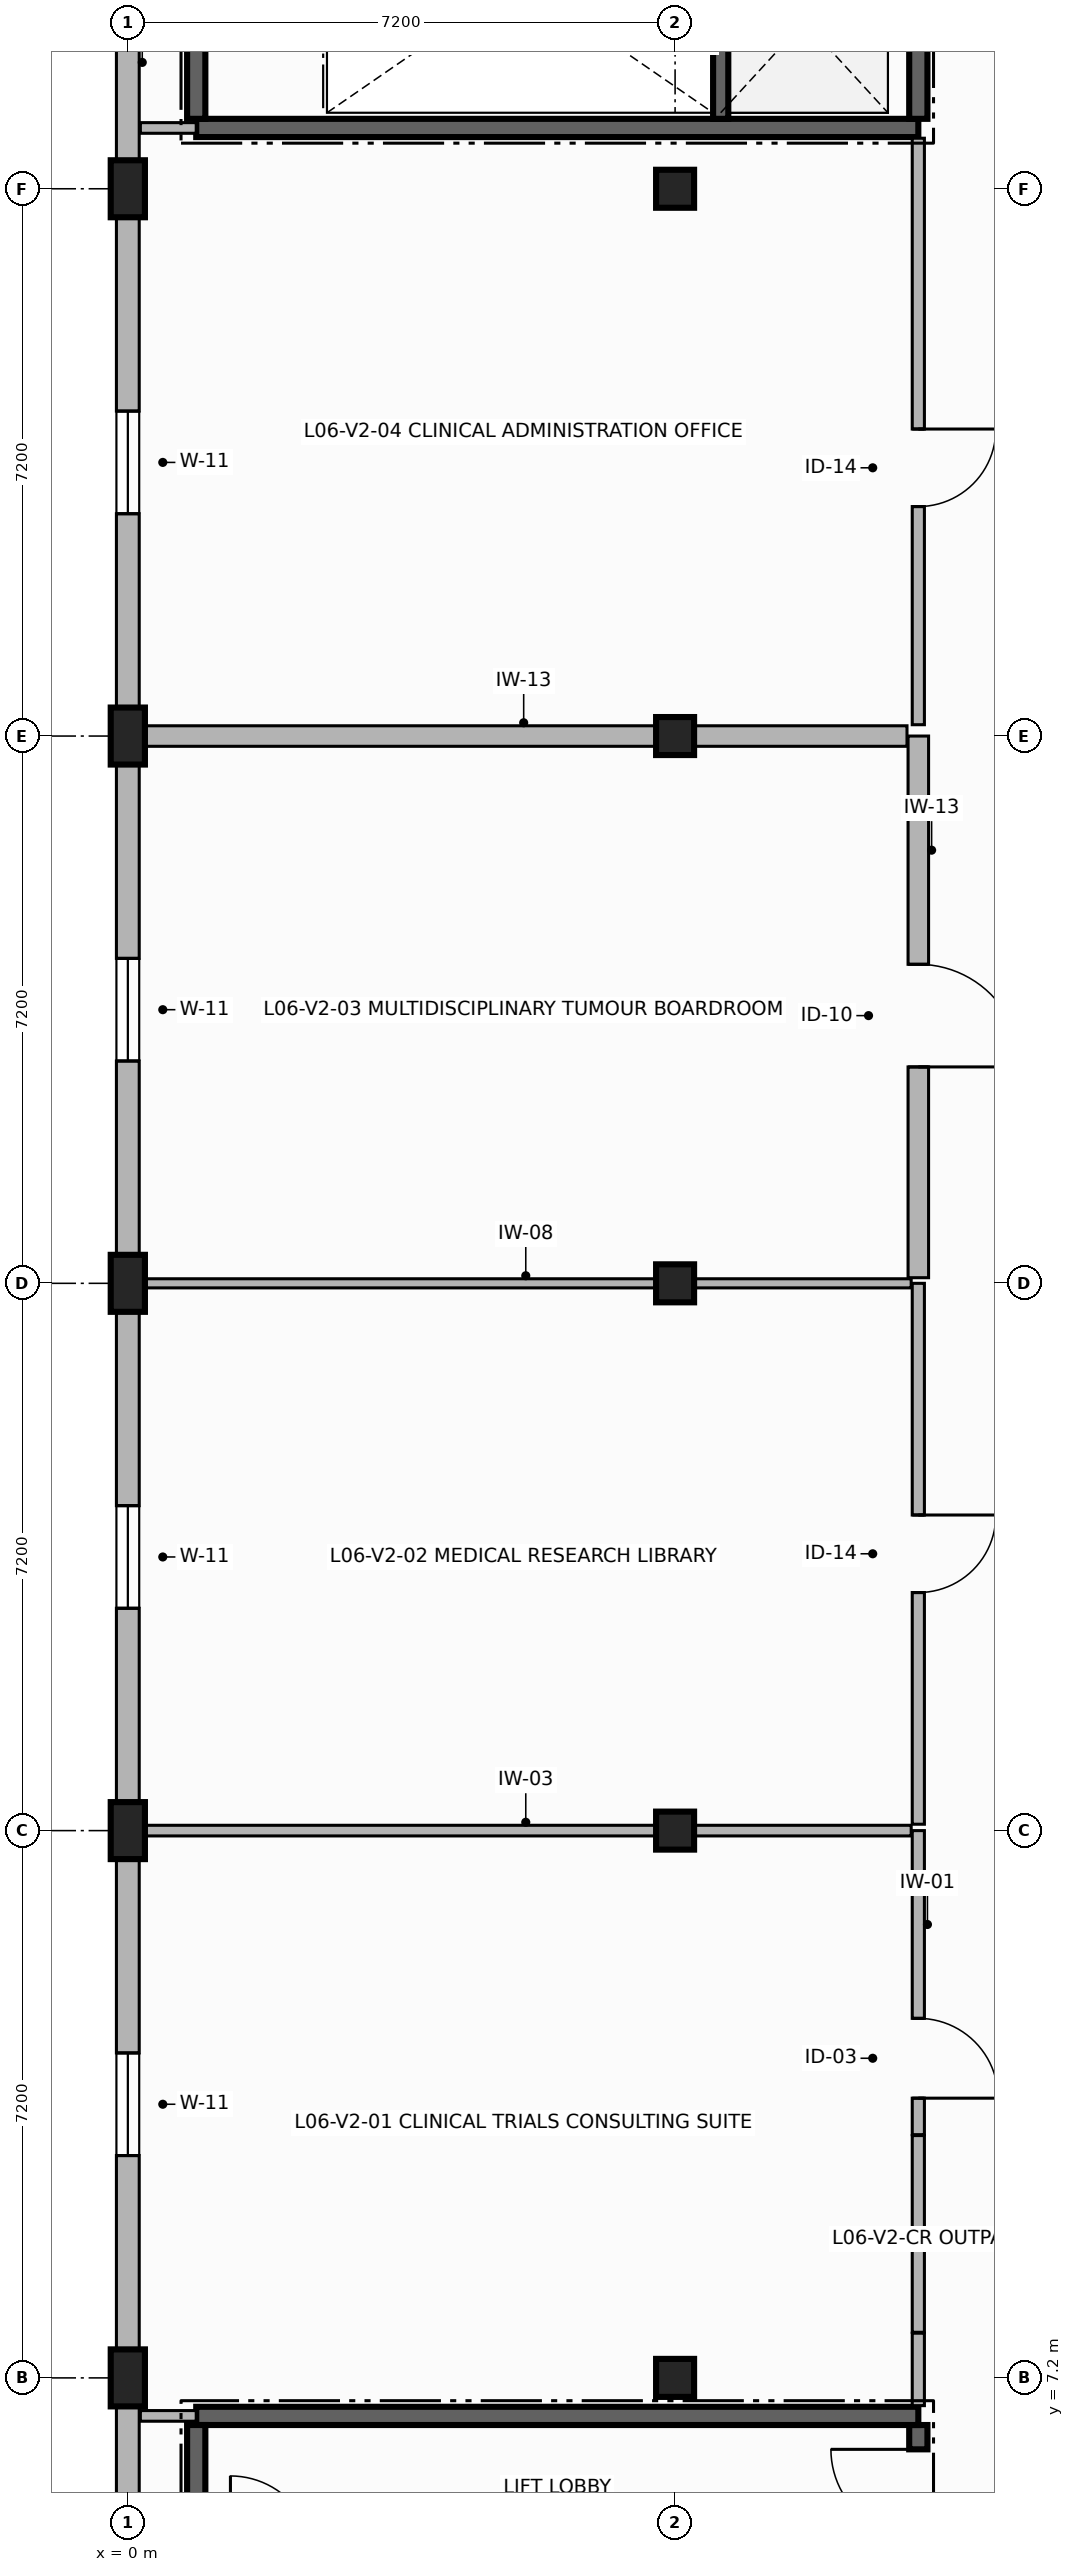
"""IFC4 building model, lengths in metres.
Left out: names, types, materials, properties, quantities, classifications, styles, units other than length and angle.
Written with IfcOpenShell. Run it as: python <this file> out.ifc"""

import sys

from ifc_helpers import new_model, si_unit, direction, frame, frame_2d, origin, origin_2d, place, context, subcontext, project, spatial, rectangle, extrude, element, fill, save


model = new_model("IFC4")
c1 = context("Model", 3, precision=1e-05, world=origin(), true_north=direction((0.0, 1.0)))
c2 = subcontext(c1, "Body", "Model", "MODEL_VIEW")
j1 = project(units=[si_unit("LENGTHUNIT", "METRE"), si_unit("PLANEANGLEUNIT", "RADIAN")], contexts=[c1])
p1 = place(None, origin())
s1 = spatial("IfcSite", under=j1, at=p1, CompositionType="ELEMENT")
p2 = place(p1, origin())
s2 = spatial("IfcBuilding", under=s1, at=p2, CompositionType="ELEMENT")
p3 = place(p2, frame((0.0, 0.0, 23.4)))
s3 = spatial("IfcBuildingStorey", under=s2, at=p3, CompositionType="ELEMENT", Elevation=23.4)
for number, where, z_axis, x_axis in (
    (1, (0.0, 7.2, 0.0), (0.0, 0.0, 1.0), (1.0, 0.0, 0.0)),
    (2, (0.0, 14.4, 0.0), (0.0, 0.0, 1.0), (1.0, 0.0, 0.0)),
    (3, (0.0, 21.6, 0.0), (0.0, 0.0, 1.0), (1.0, 0.0, 0.0)),
    (4, (0.0, 28.8, 0.0), (0.0, 0.0, 1.0), (1.0, 0.0, 0.0)),
    (5, (0.0, 36.0, 0.0), (0.0, 0.0, 1.0), (1.0, 0.0, 0.0)),
):
    element("IfcColumn", number, at=place(p3, frame(where, z_axis=z_axis, x_axis=x_axis)), inside=s3, PredefinedType="PILASTER", context=c2, shape_type="SweptSolid", body=[
        extrude(rectangle(XDim=0.45, YDim=0.75, at=origin_2d()), origin(), (0.0, 0.0, 1.0), 3.36),
    ])
for number, where, z_axis, x_axis in (
    (6, (7.2, 7.2, 0.0), (0.0, 0.0, 1.0), (1.0, 0.0, 0.0)),
    (7, (7.2, 14.4, 0.0), (0.0, 0.0, 1.0), (1.0, 0.0, 0.0)),
    (8, (7.2, 21.6, 0.0), (0.0, 0.0, 1.0), (1.0, 0.0, 0.0)),
    (9, (7.2, 28.8, 0.0), (0.0, 0.0, 1.0), (1.0, 0.0, 0.0)),
    (10, (7.2, 36.0, 0.0), (0.0, 0.0, 1.0), (1.0, 0.0, 0.0)),
):
    element("IfcColumn", number, at=place(p3, frame(where, z_axis=z_axis, x_axis=x_axis)), inside=s3, PredefinedType="COLUMN", context=c2, shape_type="SweptSolid", body=[
        extrude(rectangle(XDim=0.5, YDim=0.5, at=origin_2d()), origin(), (0.0, 0.0, 1.0), 3.36),
    ])
p4 = place(p3, frame((0.0, 43.2, 0.0), z_axis=(0.0, 0.0, 1.0), x_axis=(0.0, -1.0, 0.0)))
e11 = element("IfcWall", 11, at=p4, inside=s3, PredefinedType="SOLIDWALL", context=c2, shape_type="SweptSolid", body=[
    extrude(rectangle(XDim=7.2, YDim=0.3, at=frame_2d((3.6, 0.0))), origin(), (0.0, 0.0, 1.0), 2.69),
])
p5 = place(p4, frame((2.525, 0.0, 0.85)))
e12 = element("IfcOpeningElement", 12, at=p5, cuts=e11, PredefinedType="OPENING", context=c2, shape_type="SweptSolid", body=[
    extrude(rectangle(XDim=1.35, YDim=1.6, at=frame_2d((0.675, 0.8))), frame((0.0, 0.16, 0.0), z_axis=(0.0, -1.0, 0.0), x_axis=(1.0, 0.0, 0.0)), (0.0, 0.0, 1.0), 0.32),
])
p6 = place(p3, frame((0.0, 36.0, 0.0), z_axis=(0.0, 0.0, 1.0), x_axis=(0.0, -1.0, 0.0)))
e13 = element("IfcWall", 13, at=p6, inside=s3, PredefinedType="SOLIDWALL", context=c2, shape_type="SweptSolid", body=[
    extrude(rectangle(XDim=7.2, YDim=0.3, at=frame_2d((3.6, 0.0))), origin(), (0.0, 0.0, 1.0), 2.69),
])
p7 = place(p6, frame((2.925, 0.0, 0.85)))
e14 = element("IfcOpeningElement", 14, at=p7, cuts=e13, PredefinedType="OPENING", context=c2, shape_type="SweptSolid", body=[
    extrude(rectangle(XDim=1.35, YDim=1.6, at=frame_2d((0.675, 0.8))), frame((0.0, 0.16, 0.0), z_axis=(0.0, -1.0, 0.0), x_axis=(1.0, 0.0, 0.0)), (0.0, 0.0, 1.0), 0.32),
])
p8 = place(p3, frame((0.0, 28.8, 0.0), z_axis=(0.0, 0.0, 1.0), x_axis=(0.0, -1.0, 0.0)))
e15 = element("IfcWall", 15, at=p8, inside=s3, PredefinedType="SOLIDWALL", context=c2, shape_type="SweptSolid", body=[
    extrude(rectangle(XDim=7.2, YDim=0.3, at=frame_2d((3.6, 0.0))), origin(), (0.0, 0.0, 1.0), 2.69),
])
p9 = place(p8, frame((2.925, 0.0, 0.85)))
e16 = element("IfcOpeningElement", 16, at=p9, cuts=e15, PredefinedType="OPENING", context=c2, shape_type="SweptSolid", body=[
    extrude(rectangle(XDim=1.35, YDim=1.6, at=frame_2d((0.675, 0.8))), frame((0.0, 0.16, 0.0), z_axis=(0.0, -1.0, 0.0), x_axis=(1.0, 0.0, 0.0)), (0.0, 0.0, 1.0), 0.32),
])
p10 = place(p3, frame((0.0, 21.6, 0.0), z_axis=(0.0, 0.0, 1.0), x_axis=(0.0, -1.0, 0.0)))
e17 = element("IfcWall", 17, at=p10, inside=s3, PredefinedType="SOLIDWALL", context=c2, shape_type="SweptSolid", body=[
    extrude(rectangle(XDim=7.2, YDim=0.3, at=frame_2d((3.6, 0.0))), origin(), (0.0, 0.0, 1.0), 2.69),
])
p11 = place(p10, frame((2.925, 0.0, 0.85)))
e18 = element("IfcOpeningElement", 18, at=p11, cuts=e17, PredefinedType="OPENING", context=c2, shape_type="SweptSolid", body=[
    extrude(rectangle(XDim=1.35, YDim=1.6, at=frame_2d((0.675, 0.8))), frame((0.0, 0.16, 0.0), z_axis=(0.0, -1.0, 0.0), x_axis=(1.0, 0.0, 0.0)), (0.0, 0.0, 1.0), 0.32),
])
p12 = place(p3, frame((0.0, 14.4, 0.0), z_axis=(0.0, 0.0, 1.0), x_axis=(0.0, -1.0, 0.0)))
e19 = element("IfcWall", 19, at=p12, inside=s3, PredefinedType="SOLIDWALL", context=c2, shape_type="SweptSolid", body=[
    extrude(rectangle(XDim=7.2, YDim=0.3, at=frame_2d((3.6, 0.0))), origin(), (0.0, 0.0, 1.0), 2.69),
])
p13 = place(p12, frame((2.925, 0.0, 0.85)))
e20 = element("IfcOpeningElement", 20, at=p13, cuts=e19, PredefinedType="OPENING", context=c2, shape_type="SweptSolid", body=[
    extrude(rectangle(XDim=1.35, YDim=1.6, at=frame_2d((0.675, 0.8))), frame((0.0, 0.16, 0.0), z_axis=(0.0, -1.0, 0.0), x_axis=(1.0, 0.0, 0.0)), (0.0, 0.0, 1.0), 0.32),
])
p14 = place(p3, frame((0.0, 7.2, 0.0), z_axis=(0.0, 0.0, 1.0), x_axis=(0.0, -1.0, 0.0)))
e21 = element("IfcWall", 21, at=p14, inside=s3, PredefinedType="SOLIDWALL", context=c2, shape_type="SweptSolid", body=[
    extrude(rectangle(XDim=7.2, YDim=0.3, at=frame_2d((3.6, 0.0))), origin(), (0.0, 0.0, 1.0), 2.69),
])
p15 = place(p14, frame((3.175, 0.0, 0.85)))
e22 = element("IfcOpeningElement", 22, at=p15, cuts=e21, PredefinedType="OPENING", context=c2, shape_type="SweptSolid", body=[
    extrude(rectangle(XDim=1.35, YDim=1.6, at=frame_2d((0.675, 0.8))), frame((0.0, 0.16, 0.0), z_axis=(0.0, -1.0, 0.0), x_axis=(1.0, 0.0, 0.0)), (0.0, 0.0, 1.0), 0.32),
])
p16 = place(p3, frame((10.4, 1.02, 0.0), z_axis=(0.0, 0.0, 1.0), x_axis=(0.0, 1.0, 0.0)))
e23 = element("IfcWall", 23, at=p16, inside=s3, PredefinedType="SHEAR", context=c2, shape_type="SweptSolid", body=[
    extrude(rectangle(XDim=5.56, YDim=0.24, at=frame_2d((2.78, 0.0))), origin(), (0.0, 0.0, 1.0), 3.36),
])
p17 = place(p16, frame((4.09, 0.0, 0.0)))
e24 = element("IfcOpeningElement", 24, at=p17, cuts=e23, PredefinedType="OPENING", context=c2, shape_type="SweptSolid", body=[
    extrude(rectangle(XDim=1.15, YDim=2.2, at=frame_2d((0.575, 1.1))), frame((0.0, 0.13, 0.0), z_axis=(0.0, -1.0, 0.0), x_axis=(1.0, 0.0, 0.0)), (0.0, 0.0, 1.0), 0.26),
])
p18 = place(p3, frame((10.4, 6.7, 0.0), z_axis=(0.0, 0.0, 1.0), x_axis=(-1.0, 0.0, 0.0)))
e25 = element("IfcWall", 25, at=p18, inside=s3, PredefinedType="SHEAR", context=c2, shape_type="SweptSolid", body=[
    extrude(rectangle(XDim=9.5, YDim=0.24, at=frame_2d((4.75, 0.0))), origin(), (0.0, 0.0, 1.0), 3.36),
])
p19 = place(p3, frame((0.9, 6.58, 0.0), z_axis=(0.0, 0.0, 1.0), x_axis=(0.0, -1.0, 0.0)))
e26 = element("IfcWall", 26, at=p19, inside=s3, PredefinedType="SHEAR", context=c2, shape_type="SweptSolid", body=[
    extrude(rectangle(XDim=5.56, YDim=0.24, at=frame_2d((2.78, 0.0))), origin(), (0.0, 0.0, 1.0), 3.36),
])
p20 = place(p3, frame((0.9, 36.8, 0.0), z_axis=(0.0, 0.0, 1.0), x_axis=(1.0, 0.0, 0.0)))
e27 = element("IfcWall", 27, at=p20, inside=s3, PredefinedType="SHEAR", context=c2, shape_type="SweptSolid", body=[
    extrude(rectangle(XDim=9.5, YDim=0.24, at=frame_2d((4.75, 0.0))), origin(), (0.0, 0.0, 1.0), 3.36),
])
p21 = place(p3, frame((10.4, 36.92, 0.0), z_axis=(0.0, 0.0, 1.0), x_axis=(0.0, 1.0, 0.0)))
e28 = element("IfcWall", 28, at=p21, inside=s3, PredefinedType="SHEAR", context=c2, shape_type="SweptSolid", body=[
    extrude(rectangle(XDim=5.56, YDim=0.24, at=frame_2d((2.78, 0.0))), origin(), (0.0, 0.0, 1.0), 3.36),
])
p22 = place(p21, frame((4.09, 0.0, 0.0)))
e29 = element("IfcOpeningElement", 29, at=p22, cuts=e28, PredefinedType="OPENING", context=c2, shape_type="SweptSolid", body=[
    extrude(rectangle(XDim=1.15, YDim=2.2, at=frame_2d((0.575, 1.1))), frame((0.0, 0.13, 0.0), z_axis=(0.0, -1.0, 0.0), x_axis=(1.0, 0.0, 0.0)), (0.0, 0.0, 1.0), 0.26),
])
p23 = place(p3, frame((0.9, 42.48, 0.0), z_axis=(0.0, 0.0, 1.0), x_axis=(0.0, -1.0, 0.0)))
e30 = element("IfcWall", 30, at=p23, inside=s3, PredefinedType="SHEAR", context=c2, shape_type="SweptSolid", body=[
    extrude(rectangle(XDim=5.56, YDim=0.24, at=frame_2d((2.78, 0.0))), origin(), (0.0, 0.0, 1.0), 3.36),
])
p24 = place(p3, frame((7.8, 36.92, 0.0), z_axis=(0.0, 0.0, 1.0), x_axis=(0.0, 1.0, 0.0)))
e31 = element("IfcWall", 31, at=p24, inside=s3, PredefinedType="SHEAR", context=c2, shape_type="SweptSolid", body=[
    extrude(rectangle(XDim=3.68, YDim=0.2, at=frame_2d((1.84, 0.0))), origin(), (0.0, 0.0, 1.0), 3.36),
])
p25 = place(p3, frame((10.4, 14.4, 0.0), z_axis=(0.0, 0.0, 1.0), x_axis=(0.0, -1.0, 0.0)))
e32 = element("IfcWall", 32, at=p25, inside=s3, PredefinedType="PARTITIONING", context=c2, shape_type="SweptSolid", body=[
    extrude(rectangle(XDim=4.0, YDim=0.16, at=frame_2d((2.0, 0.0))), origin(), (0.0, 0.0, 1.0), 2.68),
])
p26 = place(p25, frame((2.47, 0.0, 0.0)))
e33 = element("IfcOpeningElement", 33, at=p26, cuts=e32, PredefinedType="OPENING", context=c2, shape_type="SweptSolid", body=[
    extrude(rectangle(XDim=1.05, YDim=2.15, at=frame_2d((0.525, 1.075))), frame((0.0, 0.09, 0.0), z_axis=(0.0, -1.0, 0.0), x_axis=(1.0, 0.0, 0.0)), (0.0, 0.0, 1.0), 0.18),
])
p27 = place(p3, frame((10.4, 10.388, 0.0), z_axis=(0.0, 0.0, 1.0), x_axis=(0.0, -1.0, 0.0)))
e34 = element("IfcWall", 34, at=p27, inside=s3, PredefinedType="PARTITIONING", context=c2, shape_type="SweptSolid", body=[
    extrude(rectangle(XDim=2.588, YDim=0.16, at=frame_2d((1.294, 0.0))), origin(), (0.0, 0.0, 1.0), 2.68),
])
p28 = place(p3, frame((10.4, 7.788, 0.0), z_axis=(0.0, 0.0, 1.0), x_axis=(0.0, -1.0, 0.0)))
e35 = element("IfcWall", 35, at=p28, inside=s3, PredefinedType="PARTITIONING", context=c2, shape_type="SweptSolid", body=[
    extrude(rectangle(XDim=0.953, YDim=0.16, at=frame_2d((0.477, 0.0))), origin(), (0.0, 0.0, 1.0), 2.68),
])
p29 = place(p3, frame((0.9, 6.7, 0.0), z_axis=(0.0, 0.0, 1.0), x_axis=(-1.0, 0.0, 0.0)))
e36 = element("IfcWall", 36, at=p29, inside=s3, PredefinedType="PARTITIONING", context=c2, shape_type="SweptSolid", body=[
    extrude(rectangle(XDim=0.735, YDim=0.14, at=frame_2d((0.367, 0.0))), origin(), (0.0, 0.0, 1.0), 2.68),
])
p30 = place(p3, frame((0.165, 14.4, 0.0), z_axis=(0.0, 0.0, 1.0), x_axis=(1.0, 0.0, 0.0)))
e37 = element("IfcWall", 37, at=p30, inside=s3, PredefinedType="PARTITIONING", context=c2, shape_type="SweptSolid", body=[
    extrude(rectangle(XDim=10.141, YDim=0.14, at=frame_2d((5.07, 0.0))), origin(), (0.0, 0.0, 1.0), 2.68),
])
p31 = place(p3, frame((10.4, 21.6, 0.0), z_axis=(0.0, 0.0, 1.0), x_axis=(0.0, -1.0, 0.0)))
e38 = element("IfcWall", 38, at=p31, inside=s3, PredefinedType="PARTITIONING", context=c2, shape_type="SweptSolid", body=[
    extrude(rectangle(XDim=7.116, YDim=0.16, at=frame_2d((3.558, 0.0))), origin(), (0.0, 0.0, 1.0), 2.68),
])
p32 = place(p31, frame((3.048, 0.0, 0.0)))
e39 = element("IfcOpeningElement", 39, at=p32, cuts=e38, PredefinedType="OPENING", context=c2, shape_type="SweptSolid", body=[
    extrude(rectangle(XDim=1.02, YDim=2.15, at=frame_2d((0.51, 1.075))), frame((0.0, 0.09, 0.0), z_axis=(0.0, -1.0, 0.0), x_axis=(1.0, 0.0, 0.0)), (0.0, 0.0, 1.0), 0.18),
])
p33 = place(p3, frame((0.165, 21.6, 0.0), z_axis=(0.0, 0.0, 1.0), x_axis=(1.0, 0.0, 0.0)))
e40 = element("IfcWall", 40, at=p33, inside=s3, PredefinedType="PARTITIONING", context=c2, shape_type="SweptSolid", body=[
    extrude(rectangle(XDim=10.141, YDim=0.12, at=frame_2d((5.07, 0.0))), origin(), (0.0, 0.0, 1.0), 2.68),
])
p34 = place(p3, frame((10.4, 28.8, 0.0), z_axis=(0.0, 0.0, 1.0), x_axis=(0.0, -1.0, 0.0)))
e41 = element("IfcWall", 41, at=p34, inside=s3, PredefinedType="PARTITIONING", context=c2, shape_type="SweptSolid", body=[
    extrude(rectangle(XDim=7.126, YDim=0.27, at=frame_2d((3.563, 0.0))), origin(), (0.0, 0.0, 1.0), 2.68),
])
p35 = place(p34, frame((3.003, 0.0, 0.0)))
e42 = element("IfcOpeningElement", 42, at=p35, cuts=e41, PredefinedType="OPENING", context=c2, shape_type="SweptSolid", body=[
    extrude(rectangle(XDim=1.35, YDim=2.25, at=frame_2d((0.675, 1.125))), frame((0.0, 0.145, 0.0), z_axis=(0.0, -1.0, 0.0), x_axis=(1.0, 0.0, 0.0)), (0.0, 0.0, 1.0), 0.29),
])
p36 = place(p3, frame((0.165, 28.8, 0.0), z_axis=(0.0, 0.0, 1.0), x_axis=(1.0, 0.0, 0.0)))
e43 = element("IfcWall", 43, at=p36, inside=s3, PredefinedType="PARTITIONING", context=c2, shape_type="SweptSolid", body=[
    extrude(rectangle(XDim=10.086, YDim=0.27, at=frame_2d((5.043, 0.0))), origin(), (0.0, 0.0, 1.0), 2.68),
])
p37 = place(p3, frame((10.4, 36.665, 0.0), z_axis=(0.0, 0.0, 1.0), x_axis=(0.0, -1.0, 0.0)))
e44 = element("IfcWall", 44, at=p37, inside=s3, PredefinedType="PARTITIONING", context=c2, shape_type="SweptSolid", body=[
    extrude(rectangle(XDim=7.716, YDim=0.16, at=frame_2d((3.858, 0.0))), origin(), (0.0, 0.0, 1.0), 2.68),
])
p38 = place(p37, frame((3.826, 0.0, 0.0)))
e45 = element("IfcOpeningElement", 45, at=p38, cuts=e44, PredefinedType="OPENING", context=c2, shape_type="SweptSolid", body=[
    extrude(rectangle(XDim=1.02, YDim=2.15, at=frame_2d((0.51, 1.075))), frame((0.0, 0.09, 0.0), z_axis=(0.0, -1.0, 0.0), x_axis=(1.0, 0.0, 0.0)), (0.0, 0.0, 1.0), 0.18),
])
p39 = place(p3, frame((0.165, 36.8, 0.0), z_axis=(0.0, 0.0, 1.0), x_axis=(1.0, 0.0, 0.0)))
e46 = element("IfcWall", 46, at=p39, inside=s3, PredefinedType="PARTITIONING", context=c2, shape_type="SweptSolid", body=[
    extrude(rectangle(XDim=0.735, YDim=0.14, at=frame_2d((0.367, 0.0))), origin(), (0.0, 0.0, 1.0), 2.68),
])
p40 = place(p7, origin())
e47 = element("IfcWindow", 47, at=p40, inside=s3, PartitioningType="SINGLE_PANEL", PredefinedType="WINDOW", context=c2, shape_type="SweptSolid", body=[
    extrude(rectangle(XDim=1.35, YDim=1.6, at=frame_2d((0.675, 0.8))), frame((0.0, 0.03, 0.0), z_axis=(0.0, -1.0, 0.0), x_axis=(1.0, 0.0, 0.0)), (0.0, 0.0, 1.0), 0.06),
])
fill(e14, e47)
p41 = place(p9, origin())
e48 = element("IfcWindow", 48, at=p41, inside=s3, PartitioningType="SINGLE_PANEL", PredefinedType="WINDOW", context=c2, shape_type="SweptSolid", body=[
    extrude(rectangle(XDim=1.35, YDim=1.6, at=frame_2d((0.675, 0.8))), frame((0.0, 0.03, 0.0), z_axis=(0.0, -1.0, 0.0), x_axis=(1.0, 0.0, 0.0)), (0.0, 0.0, 1.0), 0.06),
])
fill(e16, e48)
p42 = place(p11, origin())
e49 = element("IfcWindow", 49, at=p42, inside=s3, PartitioningType="SINGLE_PANEL", PredefinedType="WINDOW", context=c2, shape_type="SweptSolid", body=[
    extrude(rectangle(XDim=1.35, YDim=1.6, at=frame_2d((0.675, 0.8))), frame((0.0, 0.03, 0.0), z_axis=(0.0, -1.0, 0.0), x_axis=(1.0, 0.0, 0.0)), (0.0, 0.0, 1.0), 0.06),
])
fill(e18, e49)
p43 = place(p13, origin())
e50 = element("IfcWindow", 50, at=p43, inside=s3, PartitioningType="SINGLE_PANEL", PredefinedType="WINDOW", context=c2, shape_type="SweptSolid", body=[
    extrude(rectangle(XDim=1.35, YDim=1.6, at=frame_2d((0.675, 0.8))), frame((0.0, 0.03, 0.0), z_axis=(0.0, -1.0, 0.0), x_axis=(1.0, 0.0, 0.0)), (0.0, 0.0, 1.0), 0.06),
])
fill(e20, e50)
p44 = place(p17, origin())
e51 = element("IfcDoor", 51, at=p44, inside=s3, OperationType="SINGLE_SWING_RIGHT", PredefinedType="DOOR", context=c2, shape_type="SweptSolid", body=[
    extrude(rectangle(XDim=1.15, YDim=2.2, at=frame_2d((0.575, 1.1))), frame((0.0, 0.025, 0.0), z_axis=(0.0, -1.0, 0.0), x_axis=(1.0, 0.0, 0.0)), (0.0, 0.0, 1.0), 0.05),
])
fill(e24, e51)
p45 = place(p26, origin())
e52 = element("IfcDoor", 52, at=p45, inside=s3, OperationType="SINGLE_SWING_RIGHT", PredefinedType="DOOR", context=c2, shape_type="SweptSolid", body=[
    extrude(rectangle(XDim=1.05, YDim=2.15, at=frame_2d((0.525, 1.075))), frame((0.0, 0.025, 0.0), z_axis=(0.0, -1.0, 0.0), x_axis=(1.0, 0.0, 0.0)), (0.0, 0.0, 1.0), 0.05),
])
fill(e33, e52)
p46 = place(p32, origin())
e53 = element("IfcDoor", 53, at=p46, inside=s3, OperationType="SINGLE_SWING_LEFT", PredefinedType="DOOR", context=c2, shape_type="SweptSolid", body=[
    extrude(rectangle(XDim=1.02, YDim=2.15, at=frame_2d((0.51, 1.075))), frame((0.0, 0.025, 0.0), z_axis=(0.0, -1.0, 0.0), x_axis=(1.0, 0.0, 0.0)), (0.0, 0.0, 1.0), 0.05),
])
fill(e39, e53)
p47 = place(p35, origin())
e54 = element("IfcDoor", 54, at=p47, inside=s3, OperationType="SINGLE_SWING_RIGHT", PredefinedType="DOOR", context=c2, shape_type="SweptSolid", body=[
    extrude(rectangle(XDim=1.35, YDim=2.25, at=frame_2d((0.675, 1.125))), frame((0.0, 0.025, 0.0), z_axis=(0.0, -1.0, 0.0), x_axis=(1.0, 0.0, 0.0)), (0.0, 0.0, 1.0), 0.05),
])
fill(e42, e54)
p48 = place(p38, origin())
e55 = element("IfcDoor", 55, at=p48, inside=s3, OperationType="SINGLE_SWING_LEFT", PredefinedType="DOOR", context=c2, shape_type="SweptSolid", body=[
    extrude(rectangle(XDim=1.02, YDim=2.15, at=frame_2d((0.51, 1.075))), frame((0.0, 0.025, 0.0), z_axis=(0.0, -1.0, 0.0), x_axis=(1.0, 0.0, 0.0)), (0.0, 0.0, 1.0), 0.05),
])
fill(e45, e55)
save(model, sys.argv[1])
